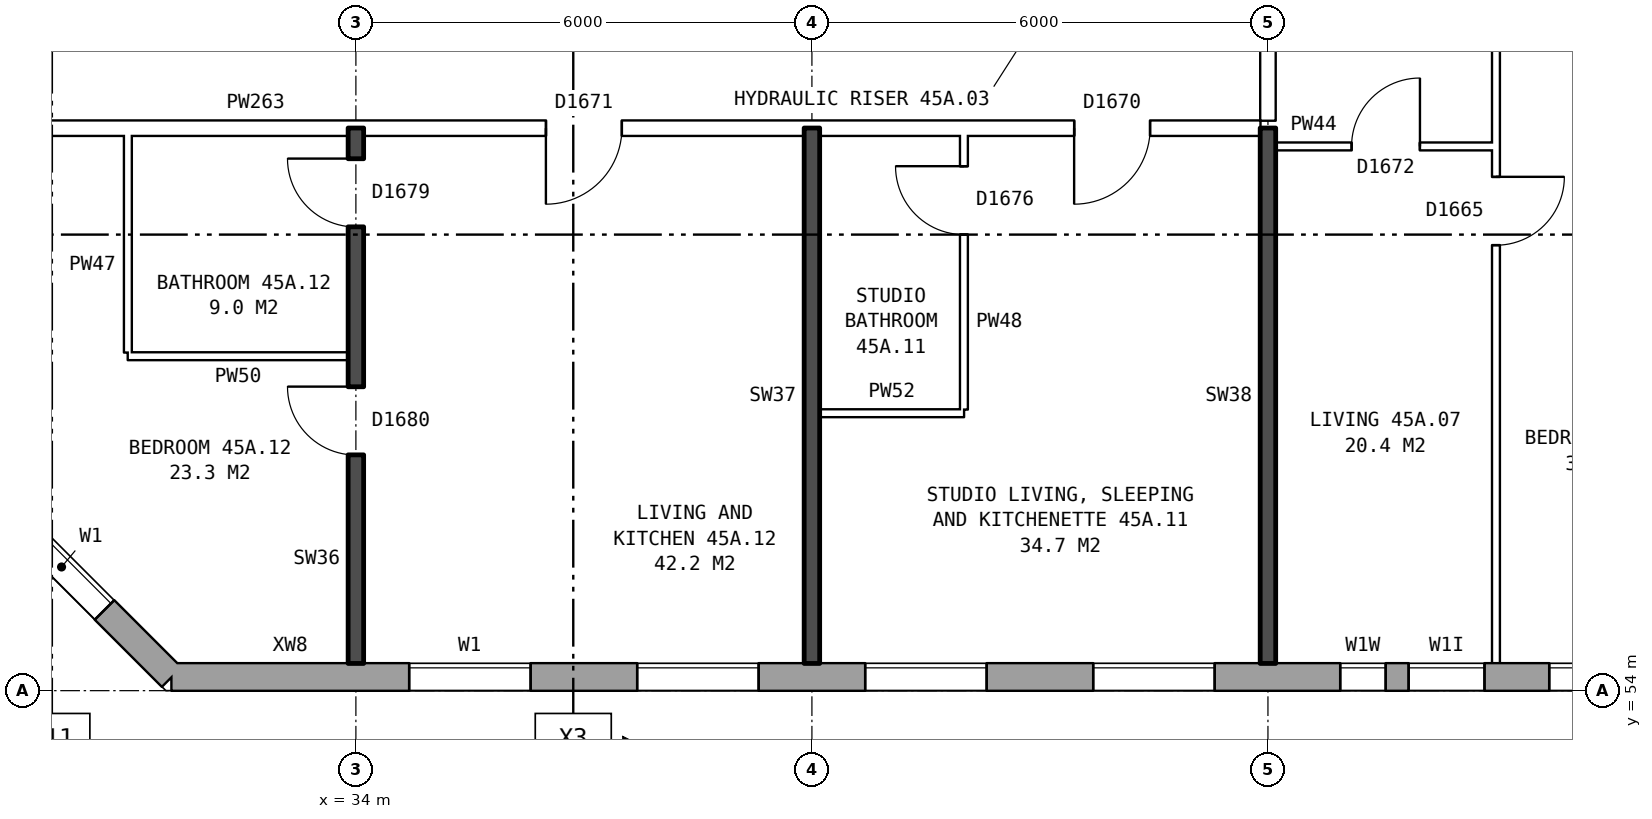
"""IFC4 building model, lengths in metres.
Left out: names, types, materials, properties, quantities, classifications, styles, units other than length and angle.
Written with IfcOpenShell. Run it as: python <this file> out.ifc"""

import sys

from ifc_helpers import new_model, si_unit, direction, frame, frame_2d, origin, place, context, subcontext, project, spatial, rectangle, extrude, element, fill, save


model = new_model("IFC4")
c1 = context("Model", 3, precision=1e-05, world=origin(), true_north=direction((0.0, 1.0)))
c2 = subcontext(c1, "Body", "Model", "MODEL_VIEW")
j1 = project(units=[si_unit("LENGTHUNIT", "METRE"), si_unit("PLANEANGLEUNIT", "RADIAN")], contexts=[c1])
p1 = place(None, origin())
s1 = spatial("IfcSite", under=j1, at=p1, CompositionType="ELEMENT")
p2 = place(p1, origin())
s2 = spatial("IfcBuilding", under=s1, at=p2, CompositionType="ELEMENT")
p3 = place(p2, frame((0.0, 0.0, 160.9)))
s3 = spatial("IfcBuildingStorey", under=s2, at=p3, CompositionType="ELEMENT", Elevation=160.9)
p4 = place(p3, frame((28.68, 57.075, 0.0), z_axis=(0.0, 0.0, 1.0), x_axis=(0.707106781187, -0.707106781187, 0.0)))
e1 = element("IfcWall", 1, at=p4, inside=s3, PredefinedType="STANDARD", context=c2, shape_type="SweptSolid", body=[
    extrude(rectangle(XDim=4.094, YDim=0.36, at=frame_2d((2.047, 0.0))), origin(), (0.0, 0.0, 1.0), 2.85),
])
p5 = place(p4, frame((1.247, 0.0, 0.8)))
e2 = element("IfcOpeningElement", 2, at=p5, cuts=e1, PredefinedType="OPENING", context=c2, shape_type="SweptSolid", body=[
    extrude(rectangle(XDim=1.6, YDim=1.8, at=frame_2d((0.8, 0.9))), frame((0.0, 0.19, 0.0), z_axis=(0.0, -1.0, 0.0), x_axis=(1.0, 0.0, 0.0)), (0.0, 0.0, 1.0), 0.38),
])
p6 = place(p3, frame((31.575, 54.18, 0.0), z_axis=(0.0, 0.0, 1.0), x_axis=(1.0, 0.0, 0.0)))
e3 = element("IfcWall", 3, at=p6, inside=s3, PredefinedType="STANDARD", context=c2, shape_type="SweptSolid", body=[
    extrude(rectangle(XDim=41.351, YDim=0.36, at=frame_2d((20.675, 0.0))), origin(), (0.0, 0.0, 1.0), 2.85),
])
p7 = place(p6, frame((3.125, 0.0, 0.8)))
e4 = element("IfcOpeningElement", 4, at=p7, cuts=e3, PredefinedType="OPENING", context=c2, shape_type="SweptSolid", body=[
    extrude(rectangle(XDim=1.6, YDim=1.8, at=frame_2d((0.8, 0.9))), frame((0.0, 0.19, 0.0), z_axis=(0.0, -1.0, 0.0), x_axis=(1.0, 0.0, 0.0)), (0.0, 0.0, 1.0), 0.38),
])
p8 = place(p6, frame((6.125, 0.0, 0.8)))
e5 = element("IfcOpeningElement", 5, at=p8, cuts=e3, PredefinedType="OPENING", context=c2, shape_type="SweptSolid", body=[
    extrude(rectangle(XDim=1.6, YDim=1.8, at=frame_2d((0.8, 0.9))), frame((0.0, 0.19, 0.0), z_axis=(0.0, -1.0, 0.0), x_axis=(1.0, 0.0, 0.0)), (0.0, 0.0, 1.0), 0.38),
])
p9 = place(p6, frame((9.125, 0.0, 0.8)))
e6 = element("IfcOpeningElement", 6, at=p9, cuts=e3, PredefinedType="OPENING", context=c2, shape_type="SweptSolid", body=[
    extrude(rectangle(XDim=1.6, YDim=1.8, at=frame_2d((0.8, 0.9))), frame((0.0, 0.19, 0.0), z_axis=(0.0, -1.0, 0.0), x_axis=(1.0, 0.0, 0.0)), (0.0, 0.0, 1.0), 0.38),
])
p10 = place(p6, frame((12.125, 0.0, 0.8)))
e7 = element("IfcOpeningElement", 7, at=p10, cuts=e3, PredefinedType="OPENING", context=c2, shape_type="SweptSolid", body=[
    extrude(rectangle(XDim=1.6, YDim=1.8, at=frame_2d((0.8, 0.9))), frame((0.0, 0.19, 0.0), z_axis=(0.0, -1.0, 0.0), x_axis=(1.0, 0.0, 0.0)), (0.0, 0.0, 1.0), 0.38),
])
p11 = place(p6, frame((15.375, 0.0, 0.25)))
e8 = element("IfcOpeningElement", 8, at=p11, cuts=e3, PredefinedType="OPENING", context=c2, shape_type="SweptSolid", body=[
    extrude(rectangle(XDim=0.6, YDim=0.9, at=frame_2d((0.3, 0.45))), frame((0.0, 0.19, 0.0), z_axis=(0.0, -1.0, 0.0), x_axis=(1.0, 0.0, 0.0)), (0.0, 0.0, 1.0), 0.38),
])
p12 = place(p6, frame((18.125, 0.0, 0.8)))
e9 = element("IfcOpeningElement", 9, at=p12, cuts=e3, PredefinedType="OPENING", context=c2, shape_type="SweptSolid", body=[
    extrude(rectangle(XDim=1.6, YDim=1.8, at=frame_2d((0.8, 0.9))), frame((0.0, 0.19, 0.0), z_axis=(0.0, -1.0, 0.0), x_axis=(1.0, 0.0, 0.0)), (0.0, 0.0, 1.0), 0.38),
])
p13 = place(p6, frame((21.125, 0.0, 0.8)))
e10 = element("IfcOpeningElement", 10, at=p13, cuts=e3, PredefinedType="OPENING", context=c2, shape_type="SweptSolid", body=[
    extrude(rectangle(XDim=1.6, YDim=1.8, at=frame_2d((0.8, 0.9))), frame((0.0, 0.19, 0.0), z_axis=(0.0, -1.0, 0.0), x_axis=(1.0, 0.0, 0.0)), (0.0, 0.0, 1.0), 0.38),
])
p14 = place(p6, frame((23.575, 0.0, 0.25)))
e11 = element("IfcOpeningElement", 11, at=p14, cuts=e3, PredefinedType="OPENING", context=c2, shape_type="SweptSolid", body=[
    extrude(rectangle(XDim=1.2, YDim=1.8, at=frame_2d((0.6, 0.9))), frame((0.0, 0.19, 0.0), z_axis=(0.0, -1.0, 0.0), x_axis=(1.0, 0.0, 0.0)), (0.0, 0.0, 1.0), 0.38),
])
p15 = place(p6, frame((26.625, 0.0, 1.7)))
e12 = element("IfcOpeningElement", 12, at=p15, cuts=e3, PredefinedType="OPENING", context=c2, shape_type="SweptSolid", body=[
    extrude(rectangle(XDim=0.6, YDim=0.9, at=frame_2d((0.3, 0.45))), frame((0.0, 0.19, 0.0), z_axis=(0.0, -1.0, 0.0), x_axis=(1.0, 0.0, 0.0)), (0.0, 0.0, 1.0), 0.38),
])
p16 = place(p6, frame((30.125, 0.0, 0.8)))
e13 = element("IfcOpeningElement", 13, at=p16, cuts=e3, PredefinedType="OPENING", context=c2, shape_type="SweptSolid", body=[
    extrude(rectangle(XDim=1.6, YDim=1.8, at=frame_2d((0.8, 0.9))), frame((0.0, 0.19, 0.0), z_axis=(0.0, -1.0, 0.0), x_axis=(1.0, 0.0, 0.0)), (0.0, 0.0, 1.0), 0.38),
])
p17 = place(p6, frame((33.125, 0.0, 0.8)))
e14 = element("IfcOpeningElement", 14, at=p17, cuts=e3, PredefinedType="OPENING", context=c2, shape_type="SweptSolid", body=[
    extrude(rectangle(XDim=1.6, YDim=1.8, at=frame_2d((0.8, 0.9))), frame((0.0, 0.19, 0.0), z_axis=(0.0, -1.0, 0.0), x_axis=(1.0, 0.0, 0.0)), (0.0, 0.0, 1.0), 0.38),
])
p18 = place(p6, frame((36.125, 0.0, 0.8)))
e15 = element("IfcOpeningElement", 15, at=p18, cuts=e3, PredefinedType="OPENING", context=c2, shape_type="SweptSolid", body=[
    extrude(rectangle(XDim=1.6, YDim=1.8, at=frame_2d((0.8, 0.9))), frame((0.0, 0.19, 0.0), z_axis=(0.0, -1.0, 0.0), x_axis=(1.0, 0.0, 0.0)), (0.0, 0.0, 1.0), 0.38),
])
p19 = place(p6, frame((39.125, 0.0, 0.8)))
e16 = element("IfcOpeningElement", 16, at=p19, cuts=e3, PredefinedType="OPENING", context=c2, shape_type="SweptSolid", body=[
    extrude(rectangle(XDim=1.6, YDim=1.8, at=frame_2d((0.8, 0.9))), frame((0.0, 0.19, 0.0), z_axis=(0.0, -1.0, 0.0), x_axis=(1.0, 0.0, 0.0)), (0.0, 0.0, 1.0), 0.38),
])
p20 = place(p6, frame((16.275, 0.0, 0.35)))
e17 = element("IfcOpeningElement", 17, at=p20, cuts=e3, PredefinedType="OPENING", context=c2, shape_type="SweptSolid", body=[
    extrude(rectangle(XDim=1.0, YDim=1.5, at=frame_2d((0.5, 0.75))), frame((0.0, 0.19, 0.0), z_axis=(0.0, -1.0, 0.0), x_axis=(1.0, 0.0, 0.0)), (0.0, 0.0, 1.0), 0.38),
])
p21 = place(p6, frame((25.075, 0.0, 0.25)))
e18 = element("IfcOpeningElement", 18, at=p21, cuts=e3, PredefinedType="OPENING", context=c2, shape_type="SweptSolid", body=[
    extrude(rectangle(XDim=0.8, YDim=0.9, at=frame_2d((0.4, 0.45))), frame((0.0, 0.19, 0.0), z_axis=(0.0, -1.0, 0.0), x_axis=(1.0, 0.0, 0.0)), (0.0, 0.0, 1.0), 0.38),
])
p22 = place(p6, frame((27.675, 0.0, 0.8)))
e19 = element("IfcOpeningElement", 19, at=p22, cuts=e3, PredefinedType="OPENING", context=c2, shape_type="SweptSolid", body=[
    extrude(rectangle(XDim=1.6, YDim=1.8, at=frame_2d((0.8, 0.9))), frame((0.0, 0.19, 0.0), z_axis=(0.0, -1.0, 0.0), x_axis=(1.0, 0.0, 0.0)), (0.0, 0.0, 1.0), 0.38),
])
p23 = place(p3, frame((40.1, 57.65, 0.0), z_axis=(0.0, 0.0, 1.0), x_axis=(1.0, 0.0, 0.0)))
e20 = element("IfcWall", 20, at=p23, inside=s3, PredefinedType="PARTITIONING", context=c2, shape_type="SweptSolid", body=[
    extrude(rectangle(XDim=1.9, YDim=0.1, at=frame_2d((0.95, 0.0))), origin(), (0.0, 0.0, 1.0), 2.85),
])
p24 = place(p3, frame((31.0, 58.4, 0.0), z_axis=(0.0, 0.0, 1.0), x_axis=(1.0, 0.0, 0.0)))
e21 = element("IfcWall", 21, at=p24, inside=s3, PredefinedType="PARTITIONING", context=c2, shape_type="SweptSolid", body=[
    extrude(rectangle(XDim=2.9, YDim=0.1, at=frame_2d((1.45, 0.0))), origin(), (0.0, 0.0, 1.0), 2.85),
])
p25 = place(p3, frame((46.1, 61.16, 0.0), z_axis=(0.0, 0.0, 1.0), x_axis=(1.0, 0.0, 0.0)))
e22 = element("IfcWall", 22, at=p25, inside=s3, PredefinedType="PARTITIONING", context=c2, shape_type="SweptSolid", body=[
    extrude(rectangle(XDim=2.9, YDim=0.1, at=frame_2d((1.45, 0.0))), origin(), (0.0, 0.0, 1.0), 2.85),
])
p26 = place(p25, frame((1.0, 0.0, 0.0)))
e23 = element("IfcOpeningElement", 23, at=p26, cuts=e22, PredefinedType="OPENING", context=c2, shape_type="SweptSolid", body=[
    extrude(rectangle(XDim=0.9, YDim=2.1, at=frame_2d((0.45, 1.05))), frame((0.0, 0.06, 0.0), z_axis=(0.0, -1.0, 0.0), x_axis=(1.0, 0.0, 0.0)), (0.0, 0.0, 1.0), 0.12),
])
p27 = place(p3, frame((28.86, 61.4, 0.0), z_axis=(0.0, 0.0, 1.0), x_axis=(1.0, 0.0, 0.0)))
e24 = element("IfcWall", 24, at=p27, inside=s3, PredefinedType="PARTITIONING", context=c2, shape_type="SweptSolid", body=[
    extrude(rectangle(XDim=17.04, YDim=0.2, at=frame_2d((8.52, 0.0))), origin(), (0.0, 0.0, 1.0), 2.85),
])
p28 = place(p27, frame((14.59, 0.0, 0.0)))
e25 = element("IfcOpeningElement", 25, at=p28, cuts=e24, PredefinedType="OPENING", context=c2, shape_type="SweptSolid", body=[
    extrude(rectangle(XDim=1.0, YDim=2.1, at=frame_2d((0.5, 1.05))), frame((0.0, 0.11, 0.0), z_axis=(0.0, -1.0, 0.0), x_axis=(1.0, 0.0, 0.0)), (0.0, 0.0, 1.0), 0.22),
])
p29 = place(p27, frame((7.64, 0.0, 0.0)))
e26 = element("IfcOpeningElement", 26, at=p29, cuts=e24, PredefinedType="OPENING", context=c2, shape_type="SweptSolid", body=[
    extrude(rectangle(XDim=1.0, YDim=2.1, at=frame_2d((0.5, 1.05))), frame((0.0, 0.11, 0.0), z_axis=(0.0, -1.0, 0.0), x_axis=(1.0, 0.0, 0.0)), (0.0, 0.0, 1.0), 0.22),
])
p30 = place(p3, frame((31.0, 58.45, 0.0), z_axis=(0.0, 0.0, 1.0), x_axis=(0.0, 1.0, 0.0)))
e27 = element("IfcWall", 27, at=p30, inside=s3, PredefinedType="PARTITIONING", context=c2, shape_type="SweptSolid", body=[
    extrude(rectangle(XDim=2.85, YDim=0.1, at=frame_2d((1.425, 0.0))), origin(), (0.0, 0.0, 1.0), 2.85),
])
p31 = place(p3, frame((34.0, 54.36, 0.0), z_axis=(0.0, 0.0, 1.0), x_axis=(0.0, 1.0, 0.0)))
e28 = element("IfcWall", 28, at=p31, inside=s3, PredefinedType="SOLIDWALL", context=c2, shape_type="SweptSolid", body=[
    extrude(rectangle(XDim=7.04, YDim=0.2, at=frame_2d((3.52, 0.0))), origin(), (0.0, 0.0, 1.0), 2.85),
])
p32 = place(p31, frame((2.74, 0.0, 0.0)))
e29 = element("IfcOpeningElement", 29, at=p32, cuts=e28, PredefinedType="OPENING", context=c2, shape_type="SweptSolid", body=[
    extrude(rectangle(XDim=0.9, YDim=2.1, at=frame_2d((0.45, 1.05))), frame((0.0, 0.11, 0.0), z_axis=(0.0, -1.0, 0.0), x_axis=(1.0, 0.0, 0.0)), (0.0, 0.0, 1.0), 0.22),
])
p33 = place(p31, frame((5.74, 0.0, 0.0)))
e30 = element("IfcOpeningElement", 30, at=p33, cuts=e28, PredefinedType="OPENING", context=c2, shape_type="SweptSolid", body=[
    extrude(rectangle(XDim=0.9, YDim=2.1, at=frame_2d((0.45, 1.05))), frame((0.0, 0.11, 0.0), z_axis=(0.0, -1.0, 0.0), x_axis=(1.0, 0.0, 0.0)), (0.0, 0.0, 1.0), 0.22),
])
p34 = place(p3, frame((40.0, 54.36, 0.0), z_axis=(0.0, 0.0, 1.0), x_axis=(0.0, 1.0, 0.0)))
e31 = element("IfcWall", 31, at=p34, inside=s3, PredefinedType="SOLIDWALL", context=c2, shape_type="SweptSolid", body=[
    extrude(rectangle(XDim=7.04, YDim=0.2, at=frame_2d((3.52, 0.0))), origin(), (0.0, 0.0, 1.0), 2.85),
])
p35 = place(p3, frame((42.0, 57.7, 0.0), z_axis=(0.0, 0.0, 1.0), x_axis=(0.0, 1.0, 0.0)))
e32 = element("IfcWall", 32, at=p35, inside=s3, PredefinedType="PARTITIONING", context=c2, shape_type="SweptSolid", body=[
    extrude(rectangle(XDim=3.6, YDim=0.1, at=frame_2d((1.8, 0.0))), origin(), (0.0, 0.0, 1.0), 2.85),
])
p36 = place(p35, frame((2.3, 0.0, 0.0)))
e33 = element("IfcOpeningElement", 33, at=p36, cuts=e32, PredefinedType="OPENING", context=c2, shape_type="SweptSolid", body=[
    extrude(rectangle(XDim=0.9, YDim=2.1, at=frame_2d((0.45, 1.05))), frame((0.0, 0.06, 0.0), z_axis=(0.0, -1.0, 0.0), x_axis=(1.0, 0.0, 0.0)), (0.0, 0.0, 1.0), 0.12),
])
p37 = place(p3, frame((46.0, 54.36, 0.0), z_axis=(0.0, 0.0, 1.0), x_axis=(0.0, 1.0, 0.0)))
e34 = element("IfcWall", 34, at=p37, inside=s3, PredefinedType="SOLIDWALL", context=c2, shape_type="SweptSolid", body=[
    extrude(rectangle(XDim=7.04, YDim=0.2, at=frame_2d((3.52, 0.0))), origin(), (0.0, 0.0, 1.0), 2.85),
])
p38 = place(p3, frame((46.0, 61.5, 0.0), z_axis=(0.0, 0.0, 1.0), x_axis=(0.0, 1.0, 0.0)))
e35 = element("IfcWall", 35, at=p38, inside=s3, PredefinedType="PARTITIONING", context=c2, shape_type="SweptSolid", body=[
    extrude(rectangle(XDim=2.2, YDim=0.2, at=frame_2d((1.1, 0.0))), origin(), (0.0, 0.0, 1.0), 2.85),
])
p39 = place(p3, frame((49.0, 54.36, 0.0), z_axis=(0.0, 0.0, 1.0), x_axis=(0.0, 1.0, 0.0)))
e36 = element("IfcWall", 36, at=p39, inside=s3, PredefinedType="PARTITIONING", context=c2, shape_type="SweptSolid", body=[
    extrude(rectangle(XDim=14.34, YDim=0.1, at=frame_2d((7.17, 0.0))), origin(), (0.0, 0.0, 1.0), 2.85),
])
p40 = place(p39, frame((5.5, 0.0, 0.0)))
e37 = element("IfcOpeningElement", 37, at=p40, cuts=e36, PredefinedType="OPENING", context=c2, shape_type="SweptSolid", body=[
    extrude(rectangle(XDim=0.9, YDim=2.1, at=frame_2d((0.45, 1.05))), frame((0.0, 0.06, 0.0), z_axis=(0.0, -1.0, 0.0), x_axis=(1.0, 0.0, 0.0)), (0.0, 0.0, 1.0), 0.12),
])
p41 = place(p39, frame((13.04, 0.0, 0.0)))
e38 = element("IfcOpeningElement", 38, at=p41, cuts=e36, PredefinedType="OPENING", context=c2, shape_type="SweptSolid", body=[
    extrude(rectangle(XDim=0.9, YDim=2.1, at=frame_2d((0.45, 1.05))), frame((0.0, 0.06, 0.0), z_axis=(0.0, -1.0, 0.0), x_axis=(1.0, 0.0, 0.0)), (0.0, 0.0, 1.0), 0.12),
])
p42 = place(p5, origin())
e39 = element("IfcWindow", 39, at=p42, inside=s3, PartitioningType="SINGLE_PANEL", PredefinedType="WINDOW", context=c2, shape_type="SweptSolid", body=[
    extrude(rectangle(XDim=1.6, YDim=1.8, at=frame_2d((0.8, 0.9))), frame((0.0, 0.15, 0.0), z_axis=(0.0, -1.0, 0.0), x_axis=(1.0, 0.0, 0.0)), (0.0, 0.0, 1.0), 0.06),
])
fill(e2, e39)
p43 = place(p7, origin())
e40 = element("IfcWindow", 40, at=p43, inside=s3, PartitioningType="SINGLE_PANEL", PredefinedType="WINDOW", context=c2, shape_type="SweptSolid", body=[
    extrude(rectangle(XDim=1.6, YDim=1.8, at=frame_2d((0.8, 0.9))), frame((0.0, 0.15, 0.0), z_axis=(0.0, -1.0, 0.0), x_axis=(1.0, 0.0, 0.0)), (0.0, 0.0, 1.0), 0.06),
])
fill(e4, e40)
p44 = place(p8, origin())
e41 = element("IfcWindow", 41, at=p44, inside=s3, PartitioningType="SINGLE_PANEL", PredefinedType="WINDOW", context=c2, shape_type="SweptSolid", body=[
    extrude(rectangle(XDim=1.6, YDim=1.8, at=frame_2d((0.8, 0.9))), frame((0.0, 0.15, 0.0), z_axis=(0.0, -1.0, 0.0), x_axis=(1.0, 0.0, 0.0)), (0.0, 0.0, 1.0), 0.06),
])
fill(e5, e41)
p45 = place(p9, origin())
e42 = element("IfcWindow", 42, at=p45, inside=s3, PartitioningType="SINGLE_PANEL", PredefinedType="WINDOW", context=c2, shape_type="SweptSolid", body=[
    extrude(rectangle(XDim=1.6, YDim=1.8, at=frame_2d((0.8, 0.9))), frame((0.0, 0.15, 0.0), z_axis=(0.0, -1.0, 0.0), x_axis=(1.0, 0.0, 0.0)), (0.0, 0.0, 1.0), 0.06),
])
fill(e6, e42)
p46 = place(p10, origin())
e43 = element("IfcWindow", 43, at=p46, inside=s3, PartitioningType="SINGLE_PANEL", PredefinedType="WINDOW", context=c2, shape_type="SweptSolid", body=[
    extrude(rectangle(XDim=1.6, YDim=1.8, at=frame_2d((0.8, 0.9))), frame((0.0, 0.15, 0.0), z_axis=(0.0, -1.0, 0.0), x_axis=(1.0, 0.0, 0.0)), (0.0, 0.0, 1.0), 0.06),
])
fill(e7, e43)
p47 = place(p11, origin())
e44 = element("IfcWindow", 44, at=p47, inside=s3, PartitioningType="SINGLE_PANEL", PredefinedType="WINDOW", context=c2, shape_type="SweptSolid", body=[
    extrude(rectangle(XDim=0.6, YDim=0.9, at=frame_2d((0.3, 0.45))), frame((0.0, 0.15, 0.0), z_axis=(0.0, -1.0, 0.0), x_axis=(1.0, 0.0, 0.0)), (0.0, 0.0, 1.0), 0.06),
])
fill(e8, e44)
p48 = place(p12, origin())
e45 = element("IfcWindow", 45, at=p48, inside=s3, PartitioningType="SINGLE_PANEL", PredefinedType="WINDOW", context=c2, shape_type="SweptSolid", body=[
    extrude(rectangle(XDim=1.6, YDim=1.8, at=frame_2d((0.8, 0.9))), frame((0.0, 0.15, 0.0), z_axis=(0.0, -1.0, 0.0), x_axis=(1.0, 0.0, 0.0)), (0.0, 0.0, 1.0), 0.06),
])
fill(e9, e45)
p49 = place(p40, frame((0.9, 0.0, 0.0), z_axis=(0.0, 0.0, 1.0), x_axis=(-1.0, 0.0, 0.0)))
e46 = element("IfcDoor", 46, at=p49, inside=s3, OperationType="SINGLE_SWING_LEFT", PredefinedType="DOOR", context=c2, shape_type="SweptSolid", body=[
    extrude(rectangle(XDim=0.9, YDim=2.1, at=frame_2d((0.45, 1.05))), frame((0.0, 0.025, 0.0), z_axis=(0.0, -1.0, 0.0), x_axis=(1.0, 0.0, 0.0)), (0.0, 0.0, 1.0), 0.05),
])
fill(e37, e46)
p50 = place(p26, origin())
e47 = element("IfcDoor", 47, at=p50, inside=s3, OperationType="SINGLE_SWING_RIGHT", PredefinedType="DOOR", context=c2, shape_type="SweptSolid", body=[
    extrude(rectangle(XDim=0.9, YDim=2.1, at=frame_2d((0.45, 1.05))), frame((0.0, 0.025, 0.0), z_axis=(0.0, -1.0, 0.0), x_axis=(1.0, 0.0, 0.0)), (0.0, 0.0, 1.0), 0.05),
])
fill(e23, e47)
p51 = place(p28, frame((1.0, 0.0, 0.0), z_axis=(0.0, 0.0, 1.0), x_axis=(-1.0, 0.0, 0.0)))
e48 = element("IfcDoor", 48, at=p51, inside=s3, OperationType="SINGLE_SWING_RIGHT", PredefinedType="DOOR", context=c2, shape_type="SweptSolid", body=[
    extrude(rectangle(XDim=1.0, YDim=2.1, at=frame_2d((0.5, 1.05))), frame((0.0, 0.025, 0.0), z_axis=(0.0, -1.0, 0.0), x_axis=(1.0, 0.0, 0.0)), (0.0, 0.0, 1.0), 0.05),
])
fill(e25, e48)
p52 = place(p36, origin())
e49 = element("IfcDoor", 49, at=p52, inside=s3, OperationType="SINGLE_SWING_RIGHT", PredefinedType="DOOR", context=c2, shape_type="SweptSolid", body=[
    extrude(rectangle(XDim=0.9, YDim=2.1, at=frame_2d((0.45, 1.05))), frame((0.0, 0.025, 0.0), z_axis=(0.0, -1.0, 0.0), x_axis=(1.0, 0.0, 0.0)), (0.0, 0.0, 1.0), 0.05),
])
fill(e33, e49)
p53 = place(p32, origin())
e50 = element("IfcDoor", 50, at=p53, inside=s3, OperationType="SINGLE_SWING_RIGHT", PredefinedType="DOOR", context=c2, shape_type="SweptSolid", body=[
    extrude(rectangle(XDim=0.9, YDim=2.1, at=frame_2d((0.45, 1.05))), frame((0.0, 0.025, 0.0), z_axis=(0.0, -1.0, 0.0), x_axis=(1.0, 0.0, 0.0)), (0.0, 0.0, 1.0), 0.05),
])
fill(e29, e50)
p54 = place(p29, frame((1.0, 0.0, 0.0), z_axis=(0.0, 0.0, 1.0), x_axis=(-1.0, 0.0, 0.0)))
e51 = element("IfcDoor", 51, at=p54, inside=s3, OperationType="SINGLE_SWING_RIGHT", PredefinedType="DOOR", context=c2, shape_type="SweptSolid", body=[
    extrude(rectangle(XDim=1.0, YDim=2.1, at=frame_2d((0.5, 1.05))), frame((0.0, 0.025, 0.0), z_axis=(0.0, -1.0, 0.0), x_axis=(1.0, 0.0, 0.0)), (0.0, 0.0, 1.0), 0.05),
])
fill(e26, e51)
p55 = place(p33, origin())
e52 = element("IfcDoor", 52, at=p55, inside=s3, OperationType="SINGLE_SWING_RIGHT", PredefinedType="DOOR", context=c2, shape_type="SweptSolid", body=[
    extrude(rectangle(XDim=0.9, YDim=2.1, at=frame_2d((0.45, 1.05))), frame((0.0, 0.025, 0.0), z_axis=(0.0, -1.0, 0.0), x_axis=(1.0, 0.0, 0.0)), (0.0, 0.0, 1.0), 0.05),
])
fill(e30, e52)
p56 = place(p20, origin())
e53 = element("IfcWindow", 53, at=p56, inside=s3, PartitioningType="SINGLE_PANEL", PredefinedType="WINDOW", context=c2, shape_type="SweptSolid", body=[
    extrude(rectangle(XDim=1.0, YDim=1.5, at=frame_2d((0.5, 0.75))), frame((0.0, 0.15, 0.0), z_axis=(0.0, -1.0, 0.0), x_axis=(1.0, 0.0, 0.0)), (0.0, 0.0, 1.0), 0.06),
])
fill(e17, e53)
save(model, sys.argv[1])
